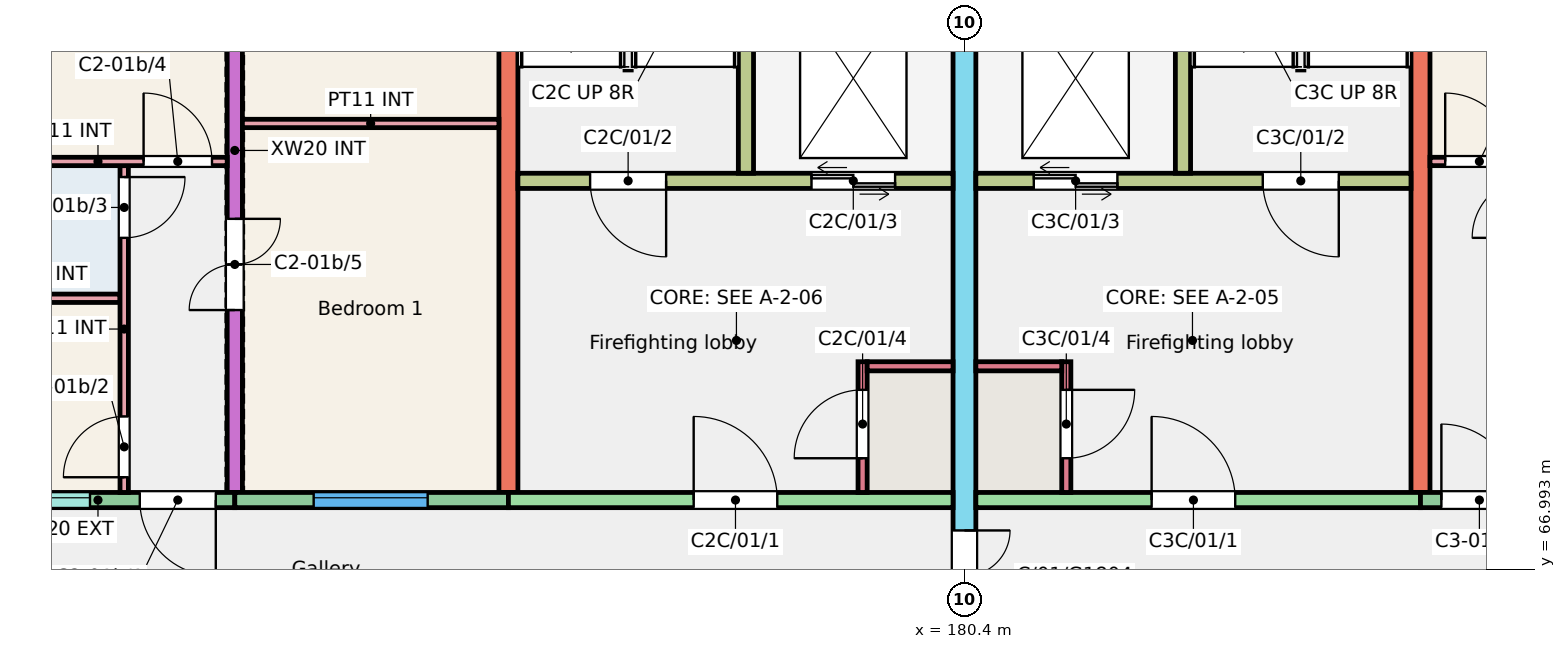
"""IFC4 building model, lengths in metres.
Left out: names, types, materials, properties, quantities, classifications, styles, units other than length and angle.
Written with IfcOpenShell. Run it as: python <this file> out.ifc"""

import sys

from ifc_helpers import new_model, si_unit, direction, frame, frame_2d, origin, place, context, subcontext, project, spatial, rectangle, extrude, element, fill, save


model = new_model("IFC4")
c1 = context("Model", 3, precision=1e-05, world=origin(), true_north=direction((0.0, 1.0)))
c2 = subcontext(c1, "Body", "Model", "MODEL_VIEW")
j1 = project(units=[si_unit("LENGTHUNIT", "METRE"), si_unit("PLANEANGLEUNIT", "RADIAN")], contexts=[c1])
p1 = place(None, origin())
s1 = spatial("IfcSite", under=j1, at=p1, CompositionType="ELEMENT")
p2 = place(p1, origin())
s2 = spatial("IfcBuilding", under=s1, at=p2, CompositionType="ELEMENT")
p3 = place(p2, frame((0.0, 0.0, 3.0)))
s3 = spatial("IfcBuildingStorey", under=s2, at=p3, CompositionType="ELEMENT", Elevation=3.0)
p4 = place(p3, frame((170.8, 68.0, 0.0), z_axis=(0.0, 0.0, 1.0), x_axis=(0.0, 1.0, 0.0)))
e1 = element("IfcWall", 1, at=p4, inside=s3, PredefinedType="SHEAR", context=c2, shape_type="SweptSolid", body=[
    extrude(rectangle(XDim=9.0, YDim=0.2, at=frame_2d((4.5, 0.0))), origin(), (0.0, 0.0, 1.0), 3.0),
])
p5 = place(p4, frame((2.4, 0.0, 0.0)))
e2 = element("IfcOpeningElement", 2, at=p5, cuts=e1, PredefinedType="OPENING", context=c2, shape_type="SweptSolid", body=[
    extrude(rectangle(XDim=1.2, YDim=2.1, at=frame_2d((0.6, 1.05))), frame((0.0, 0.11, 0.0), z_axis=(0.0, -1.0, 0.0), x_axis=(1.0, 0.0, 0.0)), (0.0, 0.0, 1.0), 0.22),
])
p6 = place(p4, frame((6.4, 0.0, 0.0)))
e3 = element("IfcOpeningElement", 3, at=p6, cuts=e1, PredefinedType="OPENING", context=c2, shape_type="SweptSolid", body=[
    extrude(rectangle(XDim=1.2, YDim=2.1, at=frame_2d((0.6, 1.05))), frame((0.0, 0.11, 0.0), z_axis=(0.0, -1.0, 0.0), x_axis=(1.0, 0.0, 0.0)), (0.0, 0.0, 1.0), 0.22),
])
p7 = place(p3, frame((174.4, 68.0, 0.0), z_axis=(0.0, 0.0, 1.0), x_axis=(0.0, 1.0, 0.0)))
e4 = element("IfcWall", 4, at=p7, inside=s3, PredefinedType="SHEAR", context=c2, shape_type="SweptSolid", body=[
    extrude(rectangle(XDim=9.0, YDim=0.25, at=frame_2d((4.5, 0.0))), origin(), (0.0, 0.0, 1.0), 3.0),
])
p8 = place(p3, frame((180.4, 66.0, 0.0), z_axis=(0.0, 0.0, 1.0), x_axis=(0.0, 1.0, 0.0)))
e5 = element("IfcWall", 5, at=p8, inside=s3, PredefinedType="SHEAR", context=c2, shape_type="SweptSolid", body=[
    extrude(rectangle(XDim=11.0, YDim=0.3, at=frame_2d((5.5, 0.0))), origin(), (0.0, 0.0, 1.0), 3.0),
])
p9 = place(p8, frame((0.3, 0.0, 0.0)))
e6 = element("IfcOpeningElement", 6, at=p9, cuts=e5, PredefinedType="OPENING", context=c2, shape_type="SweptSolid", body=[
    extrude(rectangle(XDim=1.2, YDim=2.1, at=frame_2d((0.6, 1.05))), frame((0.0, 0.16, 0.0), z_axis=(0.0, -1.0, 0.0), x_axis=(1.0, 0.0, 0.0)), (0.0, 0.0, 1.0), 0.32),
])
p10 = place(p3, frame((186.4, 68.0, 0.0), z_axis=(0.0, 0.0, 1.0), x_axis=(0.0, 1.0, 0.0)))
e7 = element("IfcWall", 7, at=p10, inside=s3, PredefinedType="SHEAR", context=c2, shape_type="SweptSolid", body=[
    extrude(rectangle(XDim=9.0, YDim=0.25, at=frame_2d((4.5, 0.0))), origin(), (0.0, 0.0, 1.0), 3.0),
])
p11 = place(p3, frame((167.2, 67.9, 0.0), z_axis=(0.0, 0.0, 1.0), x_axis=(1.0, 0.0, 0.0)))
e8 = element("IfcWall", 8, at=p11, inside=s3, PredefinedType="SOLIDWALL", context=c2, shape_type="SweptSolid", body=[
    extrude(rectangle(XDim=3.6, YDim=0.2, at=frame_2d((1.8, 0.0))), origin(), (0.0, 0.0, 1.0), 3.0),
])
p12 = place(p11, frame((0.495, 0.0, 1.1)))
e9 = element("IfcOpeningElement", 9, at=p12, cuts=e8, PredefinedType="OPENING", context=c2, shape_type="SweptSolid", body=[
    extrude(rectangle(XDim=1.2, YDim=1.3, at=frame_2d((0.6, 0.65))), frame((0.0, 0.11, 0.0), z_axis=(0.0, -1.0, 0.0), x_axis=(1.0, 0.0, 0.0)), (0.0, 0.0, 1.0), 0.22),
])
p13 = place(p11, frame((2.35, 0.0, 0.0)))
e10 = element("IfcOpeningElement", 10, at=p13, cuts=e8, PredefinedType="OPENING", context=c2, shape_type="SweptSolid", body=[
    extrude(rectangle(XDim=1.0, YDim=2.1, at=frame_2d((0.5, 1.05))), frame((0.0, 0.11, 0.0), z_axis=(0.0, -1.0, 0.0), x_axis=(1.0, 0.0, 0.0)), (0.0, 0.0, 1.0), 0.22),
])
p14 = place(p3, frame((170.8, 67.9, 0.0), z_axis=(0.0, 0.0, 1.0), x_axis=(1.0, 0.0, 0.0)))
e11 = element("IfcWall", 11, at=p14, inside=s3, PredefinedType="SOLIDWALL", context=c2, shape_type="SweptSolid", body=[
    extrude(rectangle(XDim=3.6, YDim=0.2, at=frame_2d((1.8, 0.0))), origin(), (0.0, 0.0, 1.0), 3.0),
])
p15 = place(p14, frame((1.038, 0.0, 0.9)))
e12 = element("IfcOpeningElement", 12, at=p15, cuts=e11, PredefinedType="OPENING", context=c2, shape_type="SweptSolid", body=[
    extrude(rectangle(XDim=1.5, YDim=1.5, at=frame_2d((0.75, 0.75))), frame((0.0, 0.11, 0.0), z_axis=(0.0, -1.0, 0.0), x_axis=(1.0, 0.0, 0.0)), (0.0, 0.0, 1.0), 0.22),
])
p16 = place(p3, frame((174.4, 67.9, 0.0), z_axis=(0.0, 0.0, 1.0), x_axis=(1.0, 0.0, 0.0)))
e13 = element("IfcWall", 13, at=p16, inside=s3, PredefinedType="SHEAR", context=c2, shape_type="SweptSolid", body=[
    extrude(rectangle(XDim=5.85, YDim=0.2, at=frame_2d((2.925, 0.0))), origin(), (0.0, 0.0, 1.0), 3.0),
])
p17 = place(p16, frame((2.438, 0.0, 0.0)))
e14 = element("IfcOpeningElement", 14, at=p17, cuts=e13, PredefinedType="OPENING", context=c2, shape_type="SweptSolid", body=[
    extrude(rectangle(XDim=1.1, YDim=2.1, at=frame_2d((0.55, 1.05))), frame((0.0, 0.11, 0.0), z_axis=(0.0, -1.0, 0.0), x_axis=(1.0, 0.0, 0.0)), (0.0, 0.0, 1.0), 0.22),
])
p18 = place(p3, frame((174.525, 72.1, 0.0), z_axis=(0.0, 0.0, 1.0), x_axis=(1.0, 0.0, 0.0)))
e15 = element("IfcWall", 15, at=p18, inside=s3, PredefinedType="SHEAR", context=c2, shape_type="SweptSolid", body=[
    extrude(rectangle(XDim=5.725, YDim=0.2, at=frame_2d((2.863, 0.0))), origin(), (0.0, 0.0, 1.0), 3.0),
])
p19 = place(p18, frame((0.95, 0.0, 0.0)))
e16 = element("IfcOpeningElement", 16, at=p19, cuts=e15, PredefinedType="OPENING", context=c2, shape_type="SweptSolid", body=[
    extrude(rectangle(XDim=1.0, YDim=2.1, at=frame_2d((0.5, 1.05))), frame((0.0, 0.11, 0.0), z_axis=(0.0, -1.0, 0.0), x_axis=(1.0, 0.0, 0.0)), (0.0, 0.0, 1.0), 0.22),
])
p20 = place(p18, frame((3.863, 0.0, 0.0)))
e17 = element("IfcOpeningElement", 17, at=p20, cuts=e15, PredefinedType="OPENING", context=c2, shape_type="SweptSolid", body=[
    extrude(rectangle(XDim=1.1, YDim=2.1, at=frame_2d((0.55, 1.05))), frame((0.0, 0.11, 0.0), z_axis=(0.0, -1.0, 0.0), x_axis=(1.0, 0.0, 0.0)), (0.0, 0.0, 1.0), 0.22),
])
p21 = place(p3, frame((177.525, 72.2, 0.0), z_axis=(0.0, 0.0, 1.0), x_axis=(0.0, 1.0, 0.0)))
e18 = element("IfcWall", 18, at=p21, inside=s3, PredefinedType="SHEAR", context=c2, shape_type="SweptSolid", body=[
    extrude(rectangle(XDim=4.8, YDim=0.2, at=frame_2d((2.4, 0.0))), origin(), (0.0, 0.0, 1.0), 3.0),
])
p22 = place(p3, frame((179.06, 68.0, 0.0), z_axis=(0.0, 0.0, 1.0), x_axis=(0.0, 1.0, 0.0)))
e19 = element("IfcWall", 19, at=p22, inside=s3, PredefinedType="SHEAR", context=c2, shape_type="SweptSolid", body=[
    extrude(rectangle(XDim=1.72, YDim=0.12, at=frame_2d((0.86, 0.0))), origin(), (0.0, 0.0, 1.0), 3.0),
])
p23 = place(p22, frame((0.45, 0.0, 0.0)))
e20 = element("IfcOpeningElement", 20, at=p23, cuts=e19, PredefinedType="OPENING", context=c2, shape_type="SweptSolid", body=[
    extrude(rectangle(XDim=0.9, YDim=2.1, at=frame_2d((0.45, 1.05))), frame((0.0, 0.07, 0.0), z_axis=(0.0, -1.0, 0.0), x_axis=(1.0, 0.0, 0.0)), (0.0, 0.0, 1.0), 0.14),
])
p24 = place(p3, frame((179.12, 69.66, 0.0), z_axis=(0.0, 0.0, 1.0), x_axis=(1.0, 0.0, 0.0)))
e21 = element("IfcWall", 21, at=p24, inside=s3, PredefinedType="SHEAR", context=c2, shape_type="SweptSolid", body=[
    extrude(rectangle(XDim=1.13, YDim=0.12, at=frame_2d((0.565, 0.0))), origin(), (0.0, 0.0, 1.0), 3.0),
])
p25 = place(p3, frame((180.55, 67.9, 0.0), z_axis=(0.0, 0.0, 1.0), x_axis=(1.0, 0.0, 0.0)))
e22 = element("IfcWall", 22, at=p25, inside=s3, PredefinedType="SHEAR", context=c2, shape_type="SweptSolid", body=[
    extrude(rectangle(XDim=5.85, YDim=0.2, at=frame_2d((2.925, 0.0))), origin(), (0.0, 0.0, 1.0), 3.0),
])
p26 = place(p25, frame((2.312, 0.0, 0.0)))
e23 = element("IfcOpeningElement", 23, at=p26, cuts=e22, PredefinedType="OPENING", context=c2, shape_type="SweptSolid", body=[
    extrude(rectangle(XDim=1.1, YDim=2.1, at=frame_2d((0.55, 1.05))), frame((0.0, 0.11, 0.0), z_axis=(0.0, -1.0, 0.0), x_axis=(1.0, 0.0, 0.0)), (0.0, 0.0, 1.0), 0.22),
])
p27 = place(p3, frame((180.55, 72.1, 0.0), z_axis=(0.0, 0.0, 1.0), x_axis=(1.0, 0.0, 0.0)))
e24 = element("IfcWall", 24, at=p27, inside=s3, PredefinedType="SHEAR", context=c2, shape_type="SweptSolid", body=[
    extrude(rectangle(XDim=5.725, YDim=0.2, at=frame_2d((2.862, 0.0))), origin(), (0.0, 0.0, 1.0), 3.0),
])
p28 = place(p27, frame((3.775, 0.0, 0.0)))
e25 = element("IfcOpeningElement", 25, at=p28, cuts=e24, PredefinedType="OPENING", context=c2, shape_type="SweptSolid", body=[
    extrude(rectangle(XDim=1.0, YDim=2.1, at=frame_2d((0.5, 1.05))), frame((0.0, 0.11, 0.0), z_axis=(0.0, -1.0, 0.0), x_axis=(1.0, 0.0, 0.0)), (0.0, 0.0, 1.0), 0.22),
])
p29 = place(p27, frame((0.762, 0.0, 0.0)))
e26 = element("IfcOpeningElement", 26, at=p29, cuts=e24, PredefinedType="OPENING", context=c2, shape_type="SweptSolid", body=[
    extrude(rectangle(XDim=1.1, YDim=2.1, at=frame_2d((0.55, 1.05))), frame((0.0, 0.11, 0.0), z_axis=(0.0, -1.0, 0.0), x_axis=(1.0, 0.0, 0.0)), (0.0, 0.0, 1.0), 0.22),
])
p30 = place(p3, frame((183.275, 72.2, 0.0), z_axis=(0.0, 0.0, 1.0), x_axis=(0.0, 1.0, 0.0)))
e27 = element("IfcWall", 27, at=p30, inside=s3, PredefinedType="SHEAR", context=c2, shape_type="SweptSolid", body=[
    extrude(rectangle(XDim=4.8, YDim=0.2, at=frame_2d((2.4, 0.0))), origin(), (0.0, 0.0, 1.0), 3.0),
])
p31 = place(p3, frame((181.74, 68.0, 0.0), z_axis=(0.0, 0.0, 1.0), x_axis=(0.0, 1.0, 0.0)))
e28 = element("IfcWall", 28, at=p31, inside=s3, PredefinedType="SHEAR", context=c2, shape_type="SweptSolid", body=[
    extrude(rectangle(XDim=1.72, YDim=0.12, at=frame_2d((0.86, 0.0))), origin(), (0.0, 0.0, 1.0), 3.0),
])
p32 = place(p31, frame((0.45, 0.0, 0.0)))
e29 = element("IfcOpeningElement", 29, at=p32, cuts=e28, PredefinedType="OPENING", context=c2, shape_type="SweptSolid", body=[
    extrude(rectangle(XDim=0.9, YDim=2.1, at=frame_2d((0.45, 1.05))), frame((0.0, 0.07, 0.0), z_axis=(0.0, -1.0, 0.0), x_axis=(1.0, 0.0, 0.0)), (0.0, 0.0, 1.0), 0.14),
])
p33 = place(p3, frame((180.55, 69.66, 0.0), z_axis=(0.0, 0.0, 1.0), x_axis=(1.0, 0.0, 0.0)))
e30 = element("IfcWall", 30, at=p33, inside=s3, PredefinedType="SHEAR", context=c2, shape_type="SweptSolid", body=[
    extrude(rectangle(XDim=1.13, YDim=0.12, at=frame_2d((0.565, 0.0))), origin(), (0.0, 0.0, 1.0), 3.0),
])
p34 = place(p3, frame((186.4, 67.9, 0.0), z_axis=(0.0, 0.0, 1.0), x_axis=(1.0, 0.0, 0.0)))
e31 = element("IfcWall", 31, at=p34, inside=s3, PredefinedType="SOLIDWALL", context=c2, shape_type="SweptSolid", body=[
    extrude(rectangle(XDim=3.6, YDim=0.2, at=frame_2d((1.8, 0.0))), origin(), (0.0, 0.0, 1.0), 3.0),
])
p35 = place(p34, frame((1.905, 0.0, 1.1)))
e32 = element("IfcOpeningElement", 32, at=p35, cuts=e31, PredefinedType="OPENING", context=c2, shape_type="SweptSolid", body=[
    extrude(rectangle(XDim=1.2, YDim=1.3, at=frame_2d((0.6, 0.65))), frame((0.0, 0.11, 0.0), z_axis=(0.0, -1.0, 0.0), x_axis=(1.0, 0.0, 0.0)), (0.0, 0.0, 1.0), 0.22),
])
p36 = place(p34, frame((0.275, 0.0, 0.0)))
e33 = element("IfcOpeningElement", 33, at=p36, cuts=e31, PredefinedType="OPENING", context=c2, shape_type="SweptSolid", body=[
    extrude(rectangle(XDim=1.0, YDim=2.1, at=frame_2d((0.5, 1.05))), frame((0.0, 0.11, 0.0), z_axis=(0.0, -1.0, 0.0), x_axis=(1.0, 0.0, 0.0)), (0.0, 0.0, 1.0), 0.22),
])
p37 = place(p3, frame((167.3, 70.555, 0.0), z_axis=(0.0, 0.0, 1.0), x_axis=(1.0, 0.0, 0.0)))
e34 = element("IfcWall", 34, at=p37, inside=s3, PredefinedType="PARTITIONING", context=c2, shape_type="SweptSolid", body=[
    extrude(rectangle(XDim=1.99, YDim=0.11, at=frame_2d((0.995, 0.0))), origin(), (0.0, 0.0, 1.0), 2.8),
])
p38 = place(p3, frame((169.345, 68.0, 0.0), z_axis=(0.0, 0.0, 1.0), x_axis=(0.0, 1.0, 0.0)))
e35 = element("IfcWall", 35, at=p38, inside=s3, PredefinedType="PARTITIONING", context=c2, shape_type="SweptSolid", body=[
    extrude(rectangle(XDim=4.3, YDim=0.11, at=frame_2d((2.15, 0.0))), origin(), (0.0, 0.0, 1.0), 2.8),
])
p39 = place(p38, frame((0.2, 0.0, 0.0)))
e36 = element("IfcOpeningElement", 36, at=p39, cuts=e35, PredefinedType="OPENING", context=c2, shape_type="SweptSolid", body=[
    extrude(rectangle(XDim=0.8, YDim=2.1, at=frame_2d((0.4, 1.05))), frame((0.0, 0.065, 0.0), z_axis=(0.0, -1.0, 0.0), x_axis=(1.0, 0.0, 0.0)), (0.0, 0.0, 1.0), 0.13),
])
p40 = place(p38, frame((3.35, 0.0, 0.0)))
e37 = element("IfcOpeningElement", 37, at=p40, cuts=e35, PredefinedType="OPENING", context=c2, shape_type="SweptSolid", body=[
    extrude(rectangle(XDim=0.8, YDim=2.1, at=frame_2d((0.4, 1.05))), frame((0.0, 0.065, 0.0), z_axis=(0.0, -1.0, 0.0), x_axis=(1.0, 0.0, 0.0)), (0.0, 0.0, 1.0), 0.13),
])
p41 = place(p3, frame((167.3, 72.355, 0.0), z_axis=(0.0, 0.0, 1.0), x_axis=(1.0, 0.0, 0.0)))
e38 = element("IfcWall", 38, at=p41, inside=s3, PredefinedType="PARTITIONING", context=c2, shape_type="SweptSolid", body=[
    extrude(rectangle(XDim=3.4, YDim=0.11, at=frame_2d((1.7, 0.0))), origin(), (0.0, 0.0, 1.0), 2.8),
])
p42 = place(p41, frame((2.3, 0.0, 0.0)))
e39 = element("IfcOpeningElement", 39, at=p42, cuts=e38, PredefinedType="OPENING", context=c2, shape_type="SweptSolid", body=[
    extrude(rectangle(XDim=0.9, YDim=2.1, at=frame_2d((0.45, 1.05))), frame((0.0, 0.065, 0.0), z_axis=(0.0, -1.0, 0.0), x_axis=(1.0, 0.0, 0.0)), (0.0, 0.0, 1.0), 0.13),
])
p43 = place(p3, frame((170.9, 72.855, 0.0), z_axis=(0.0, 0.0, 1.0), x_axis=(1.0, 0.0, 0.0)))
e40 = element("IfcWall", 40, at=p43, inside=s3, PredefinedType="PARTITIONING", context=c2, shape_type="SweptSolid", body=[
    extrude(rectangle(XDim=3.375, YDim=0.11, at=frame_2d((1.688, 0.0))), origin(), (0.0, 0.0, 1.0), 2.8),
])
p44 = place(p3, frame((186.525, 72.355, 0.0), z_axis=(0.0, 0.0, 1.0), x_axis=(1.0, 0.0, 0.0)))
e41 = element("IfcWall", 41, at=p44, inside=s3, PredefinedType="PARTITIONING", context=c2, shape_type="SweptSolid", body=[
    extrude(rectangle(XDim=3.35, YDim=0.11, at=frame_2d((1.675, 0.0))), origin(), (0.0, 0.0, 1.0), 2.8),
])
p45 = place(p44, frame((0.2, 0.0, 0.0)))
e42 = element("IfcOpeningElement", 42, at=p45, cuts=e41, PredefinedType="OPENING", context=c2, shape_type="SweptSolid", body=[
    extrude(rectangle(XDim=0.9, YDim=2.1, at=frame_2d((0.45, 1.05))), frame((0.0, 0.065, 0.0), z_axis=(0.0, -1.0, 0.0), x_axis=(1.0, 0.0, 0.0)), (0.0, 0.0, 1.0), 0.13),
])
p46 = place(p15, origin())
e43 = element("IfcWindow", 43, at=p46, inside=s3, PartitioningType="SINGLE_PANEL", PredefinedType="WINDOW", context=c2, shape_type="SweptSolid", body=[
    extrude(rectangle(XDim=1.5, YDim=1.5, at=frame_2d((0.75, 0.75))), frame((0.0, 0.06, 0.0), z_axis=(0.0, -1.0, 0.0), x_axis=(1.0, 0.0, 0.0)), (0.0, 0.0, 1.0), 0.06),
])
fill(e12, e43)
p47 = place(p12, origin())
e44 = element("IfcWindow", 44, at=p47, inside=s3, PartitioningType="SINGLE_PANEL", PredefinedType="WINDOW", context=c2, shape_type="SweptSolid", body=[
    extrude(rectangle(XDim=1.2, YDim=1.3, at=frame_2d((0.6, 0.65))), frame((0.0, 0.06, 0.0), z_axis=(0.0, -1.0, 0.0), x_axis=(1.0, 0.0, 0.0)), (0.0, 0.0, 1.0), 0.06),
])
fill(e9, e44)
p48 = place(p13, origin())
e45 = element("IfcDoor", 45, at=p48, inside=s3, OperationType="SINGLE_SWING_RIGHT", PredefinedType="DOOR", context=c2, shape_type="SweptSolid", body=[
    extrude(rectangle(XDim=1.0, YDim=2.1, at=frame_2d((0.5, 1.05))), frame((0.0, 0.025, 0.0), z_axis=(0.0, -1.0, 0.0), x_axis=(1.0, 0.0, 0.0)), (0.0, 0.0, 1.0), 0.05),
])
fill(e10, e45)
p49 = place(p39, origin())
e46 = element("IfcDoor", 46, at=p49, inside=s3, OperationType="SINGLE_SWING_LEFT", PredefinedType="DOOR", context=c2, shape_type="SweptSolid", body=[
    extrude(rectangle(XDim=0.8, YDim=2.1, at=frame_2d((0.4, 1.05))), frame((0.0, 0.025, 0.0), z_axis=(0.0, -1.0, 0.0), x_axis=(1.0, 0.0, 0.0)), (0.0, 0.0, 1.0), 0.05),
])
fill(e36, e46)
p50 = place(p40, origin())
e47 = element("IfcDoor", 47, at=p50, inside=s3, OperationType="SINGLE_SWING_RIGHT", PredefinedType="DOOR", context=c2, shape_type="SweptSolid", body=[
    extrude(rectangle(XDim=0.8, YDim=2.1, at=frame_2d((0.4, 1.05))), frame((0.0, 0.025, 0.0), z_axis=(0.0, -1.0, 0.0), x_axis=(1.0, 0.0, 0.0)), (0.0, 0.0, 1.0), 0.05),
])
fill(e37, e47)
p51 = place(p42, origin())
e48 = element("IfcDoor", 48, at=p51, inside=s3, OperationType="SINGLE_SWING_LEFT", PredefinedType="DOOR", context=c2, shape_type="SweptSolid", body=[
    extrude(rectangle(XDim=0.9, YDim=2.1, at=frame_2d((0.45, 1.05))), frame((0.0, 0.025, 0.0), z_axis=(0.0, -1.0, 0.0), x_axis=(1.0, 0.0, 0.0)), (0.0, 0.0, 1.0), 0.05),
])
fill(e39, e48)
p52 = place(p5, origin())
e49 = element("IfcDoor", 49, at=p52, inside=s3, OperationType="DOUBLE_DOOR_SINGLE_SWING", PredefinedType="DOOR", context=c2, shape_type="SweptSolid", body=[
    extrude(rectangle(XDim=1.2, YDim=2.1, at=frame_2d((0.6, 1.05))), frame((0.0, 0.025, 0.0), z_axis=(0.0, -1.0, 0.0), x_axis=(1.0, 0.0, 0.0)), (0.0, 0.0, 1.0), 0.05),
])
fill(e2, e49)
p53 = place(p36, origin())
e50 = element("IfcDoor", 50, at=p53, inside=s3, OperationType="SINGLE_SWING_LEFT", PredefinedType="DOOR", context=c2, shape_type="SweptSolid", body=[
    extrude(rectangle(XDim=1.0, YDim=2.1, at=frame_2d((0.5, 1.05))), frame((0.0, 0.025, 0.0), z_axis=(0.0, -1.0, 0.0), x_axis=(1.0, 0.0, 0.0)), (0.0, 0.0, 1.0), 0.05),
])
fill(e33, e50)
p54 = place(p45, origin())
e51 = element("IfcDoor", 51, at=p54, inside=s3, OperationType="SINGLE_SWING_LEFT", PredefinedType="DOOR", context=c2, shape_type="SweptSolid", body=[
    extrude(rectangle(XDim=0.9, YDim=2.1, at=frame_2d((0.45, 1.05))), frame((0.0, 0.025, 0.0), z_axis=(0.0, -1.0, 0.0), x_axis=(1.0, 0.0, 0.0)), (0.0, 0.0, 1.0), 0.05),
])
fill(e42, e51)
p55 = place(p17, origin())
e52 = element("IfcDoor", 52, at=p55, inside=s3, OperationType="SINGLE_SWING_LEFT", PredefinedType="DOOR", context=c2, shape_type="SweptSolid", body=[
    extrude(rectangle(XDim=1.1, YDim=2.1, at=frame_2d((0.55, 1.05))), frame((0.0, 0.025, 0.0), z_axis=(0.0, -1.0, 0.0), x_axis=(1.0, 0.0, 0.0)), (0.0, 0.0, 1.0), 0.05),
])
fill(e14, e52)
p56 = place(p19, origin())
e53 = element("IfcDoor", 53, at=p56, inside=s3, OperationType="SINGLE_SWING_RIGHT", PredefinedType="DOOR", context=c2, shape_type="SweptSolid", body=[
    extrude(rectangle(XDim=1.0, YDim=2.1, at=frame_2d((0.5, 1.05))), frame((0.0, 0.025, 0.0), z_axis=(0.0, -1.0, 0.0), x_axis=(1.0, 0.0, 0.0)), (0.0, 0.0, 1.0), 0.05),
])
fill(e16, e53)
p57 = place(p20, origin())
e54 = element("IfcDoor", 54, at=p57, inside=s3, OperationType="DOUBLE_DOOR_SLIDING", PredefinedType="DOOR", context=c2, shape_type="SweptSolid", body=[
    extrude(rectangle(XDim=1.1, YDim=2.1, at=frame_2d((0.55, 1.05))), frame((0.0, 0.025, 0.0), z_axis=(0.0, -1.0, 0.0), x_axis=(1.0, 0.0, 0.0)), (0.0, 0.0, 1.0), 0.05),
])
fill(e17, e54)
p58 = place(p23, origin())
e55 = element("IfcDoor", 55, at=p58, inside=s3, OperationType="SINGLE_SWING_LEFT", PredefinedType="DOOR", context=c2, shape_type="SweptSolid", body=[
    extrude(rectangle(XDim=0.9, YDim=2.1, at=frame_2d((0.45, 1.05))), frame((0.0, 0.025, 0.0), z_axis=(0.0, -1.0, 0.0), x_axis=(1.0, 0.0, 0.0)), (0.0, 0.0, 1.0), 0.05),
])
fill(e20, e55)
p59 = place(p26, origin())
e56 = element("IfcDoor", 56, at=p59, inside=s3, OperationType="SINGLE_SWING_LEFT", PredefinedType="DOOR", context=c2, shape_type="SweptSolid", body=[
    extrude(rectangle(XDim=1.1, YDim=2.1, at=frame_2d((0.55, 1.05))), frame((0.0, 0.025, 0.0), z_axis=(0.0, -1.0, 0.0), x_axis=(1.0, 0.0, 0.0)), (0.0, 0.0, 1.0), 0.05),
])
fill(e23, e56)
p60 = place(p28, origin())
e57 = element("IfcDoor", 57, at=p60, inside=s3, OperationType="SINGLE_SWING_RIGHT", PredefinedType="DOOR", context=c2, shape_type="SweptSolid", body=[
    extrude(rectangle(XDim=1.0, YDim=2.1, at=frame_2d((0.5, 1.05))), frame((0.0, 0.025, 0.0), z_axis=(0.0, -1.0, 0.0), x_axis=(1.0, 0.0, 0.0)), (0.0, 0.0, 1.0), 0.05),
])
fill(e25, e57)
p61 = place(p29, origin())
e58 = element("IfcDoor", 58, at=p61, inside=s3, OperationType="DOUBLE_DOOR_SLIDING", PredefinedType="DOOR", context=c2, shape_type="SweptSolid", body=[
    extrude(rectangle(XDim=1.1, YDim=2.1, at=frame_2d((0.55, 1.05))), frame((0.0, 0.025, 0.0), z_axis=(0.0, -1.0, 0.0), x_axis=(1.0, 0.0, 0.0)), (0.0, 0.0, 1.0), 0.05),
])
fill(e26, e58)
p62 = place(p32, origin())
e59 = element("IfcDoor", 59, at=p62, inside=s3, OperationType="SINGLE_SWING_RIGHT", PredefinedType="DOOR", context=c2, shape_type="SweptSolid", body=[
    extrude(rectangle(XDim=0.9, YDim=2.1, at=frame_2d((0.45, 1.05))), frame((0.0, 0.025, 0.0), z_axis=(0.0, -1.0, 0.0), x_axis=(1.0, 0.0, 0.0)), (0.0, 0.0, 1.0), 0.05),
])
fill(e29, e59)
p63 = place(p9, origin())
e60 = element("IfcDoor", 60, at=p63, inside=s3, OperationType="DOUBLE_DOOR_SINGLE_SWING", PredefinedType="DOOR", context=c2, shape_type="SweptSolid", body=[
    extrude(rectangle(XDim=1.2, YDim=2.1, at=frame_2d((0.6, 1.05))), frame((0.0, 0.025, 0.0), z_axis=(0.0, -1.0, 0.0), x_axis=(1.0, 0.0, 0.0)), (0.0, 0.0, 1.0), 0.05),
])
fill(e6, e60)
save(model, sys.argv[1])
